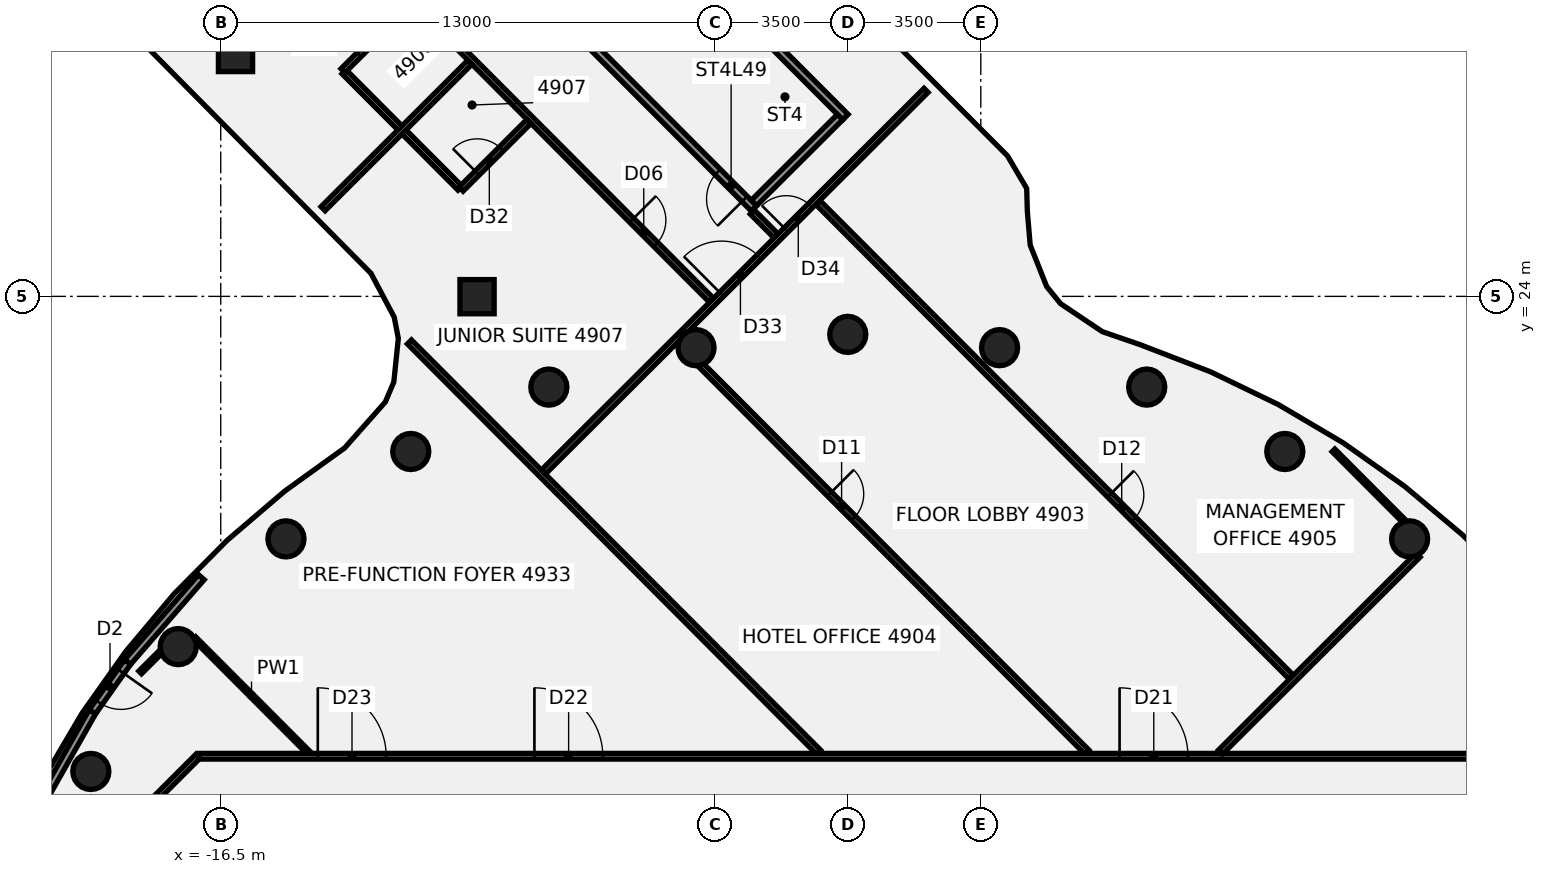
"""IFC4 building model, lengths in metres.
Left out: names, types, materials, properties, quantities, classifications, styles, units other than length and angle.
Written with IfcOpenShell. Run it as: python <this file> out.ifc"""

import sys

from ifc_helpers import new_model, si_unit, direction, frame, frame_2d, origin, origin_2d, place, context, subcontext, project, spatial, rectangle, circle, extrude, element, fill, save


model = new_model("IFC4")
c1 = context("Model", 3, precision=1e-05, world=origin(), true_north=direction((0.0, 1.0)))
c2 = subcontext(c1, "Body", "Model", "MODEL_VIEW")
j1 = project(units=[si_unit("LENGTHUNIT", "METRE"), si_unit("PLANEANGLEUNIT", "RADIAN")], contexts=[c1])
p1 = place(None, origin())
s1 = spatial("IfcSite", under=j1, at=p1, CompositionType="ELEMENT")
p2 = place(p1, origin())
s2 = spatial("IfcBuilding", under=s1, at=p2, CompositionType="ELEMENT")
p3 = place(p2, frame((0.0, 0.0, 196.9)))
s3 = spatial("IfcBuildingStorey", under=s2, at=p3, CompositionType="ELEMENT", Elevation=196.9)
for number, where, z_axis, x_axis in (
    (1, (14.784, 17.619, -0.14), (0.0, 0.0, 1.0), (1.0, 0.0, 0.0)),
    (2, (11.5, 19.919, -0.14), (0.0, 0.0, 1.0), (1.0, 0.0, 0.0)),
    (3, (7.866, 21.613, -0.14), (0.0, 0.0, 1.0), (1.0, 0.0, 0.0)),
    (4, (3.994, 22.651, -0.14), (0.0, 0.0, 1.0), (1.0, 0.0, 0.0)),
    (5, (0.0, 23.0, -0.14), (0.0, 0.0, 1.0), (1.0, 0.0, 0.0)),
    (6, (-3.994, 22.651, -0.14), (0.0, 0.0, 1.0), (1.0, 0.0, 0.0)),
    (7, (-7.866, 21.613, -0.14), (0.0, 0.0, 1.0), (1.0, 0.0, 0.0)),
    (8, (-11.5, 19.919, -0.14), (0.0, 0.0, 1.0), (1.0, 0.0, 0.0)),
    (9, (-14.784, 17.619, -0.14), (0.0, 0.0, 1.0), (1.0, 0.0, 0.0)),
    (10, (-17.619, 14.784, -0.14), (0.0, 0.0, 1.0), (1.0, 0.0, 0.0)),
    (11, (-19.919, 11.5, -0.14), (0.0, 0.0, 1.0), (1.0, 0.0, 0.0)),
):
    element("IfcColumn", number, at=place(p3, frame(where, z_axis=z_axis, x_axis=x_axis)), inside=s3, PredefinedType="COLUMN", context=c2, shape_type="SweptSolid", body=[
        extrude(circle(Radius=0.475, at=origin_2d()), origin(), (0.0, 0.0, 1.0), 3.6),
    ])
p4 = place(p3, frame((-16.111, 30.365, -0.138), z_axis=(-0.041429721391, -0.081642909364, 0.995800187556), x_axis=(0.70609506341, 0.702753082609, 0.086993484299)))
e12 = element("IfcColumn", 12, at=p4, inside=s3, PredefinedType="COLUMN", context=c2, shape_type="SweptSolid", body=[
    extrude(rectangle(XDim=0.9, YDim=0.9, at=origin_2d()), origin(), (0.0, 0.0, 1.0), 3.612),
])
p5 = place(p3, frame((-9.756, 23.992, -0.139), z_axis=(-0.009624668379, -0.04947892899, 0.998728792688), x_axis=(0.70765331906, 0.705324503584, 0.041762718624)))
e13 = element("IfcColumn", 13, at=p5, inside=s3, PredefinedType="COLUMN", context=c2, shape_type="SweptSolid", body=[
    extrude(rectangle(XDim=0.9, YDim=0.9, at=origin_2d()), origin(), (0.0, 0.0, 1.0), 3.602),
])
p6 = place(p3, frame((-17.193, 15.006, 0.0), z_axis=(0.0, 0.0, 1.0), x_axis=(0.706159706794, -0.708052588796, 0.0)))
e14 = element("IfcWall", 14, at=p6, inside=s3, PredefinedType="PARTITIONING", context=c2, shape_type="SweptSolid", body=[
    extrude(rectangle(XDim=4.256, YDim=0.1, at=frame_2d((2.128, 0.0))), origin(), (0.0, 0.0, 1.0), 2.864),
])
p7 = place(p3, frame((-16.188, 36.531, 0.0), z_axis=(0.0, 0.0, 1.0), x_axis=(0.706223553461, -0.707988907071, 0.0)))
e15 = element("IfcWall", 15, at=p7, inside=s3, PredefinedType="PARTITIONING", context=c2, shape_type="SweptSolid", body=[
    extrude(rectangle(XDim=17.84, YDim=0.15, at=frame_2d((8.92, 0.0))), origin(), (0.0, 0.0, 1.0), 2.864),
])
p8 = place(p7, frame((14.87, 0.0, 0.0)))
e16 = element("IfcOpeningElement", 16, at=p8, cuts=e15, PredefinedType="OPENING", context=c2, shape_type="SweptSolid", body=[
    extrude(rectangle(XDim=0.9, YDim=2.1, at=frame_2d((0.45, 1.05))), frame((0.0, 0.085, 0.0), z_axis=(0.0, -1.0, 0.0), x_axis=(1.0, 0.0, 0.0)), (0.0, 0.0, 1.0), 0.17),
])
p9 = place(p7, frame((3.82, 0.0, 0.0)))
e17 = element("IfcOpeningElement", 17, at=p9, cuts=e15, PredefinedType="OPENING", context=c2, shape_type="SweptSolid", body=[
    extrude(rectangle(XDim=0.9, YDim=2.1, at=frame_2d((0.45, 1.05))), frame((0.0, 0.085, 0.0), z_axis=(0.0, -1.0, 0.0), x_axis=(1.0, 0.0, 0.0)), (0.0, 0.0, 1.0), 0.17),
])
p10 = place(p3, frame((-2.512, 26.218, 0.0), z_axis=(0.0, 0.0, 1.0), x_axis=(0.706135386727, -0.708076843014, 0.0)))
e18 = element("IfcWall", 18, at=p10, inside=s3, PredefinedType="PARTITIONING", context=c2, shape_type="SweptSolid", body=[
    extrude(rectangle(XDim=0.88, YDim=0.15, at=frame_2d((0.44, 0.0))), origin(), (0.0, 0.0, 1.0), 2.864),
])
p11 = place(p3, frame((-13.255, 29.909, 0.0), z_axis=(0.0, 0.0, 1.0), x_axis=(0.706004027444, -0.708207817829, 0.0)))
e19 = element("IfcWall", 19, at=p11, inside=s3, PredefinedType="PARTITIONING", context=c2, shape_type="SweptSolid", body=[
    extrude(rectangle(XDim=4.321, YDim=0.15, at=frame_2d((2.16, 0.0))), origin(), (0.0, 0.0, 1.0), 2.864),
])
p12 = place(p3, frame((-11.534, 22.801, 0.0), z_axis=(0.0, 0.0, 1.0), x_axis=(0.706225272802, -0.707987192014, 0.0)))
e20 = element("IfcWall", 20, at=p12, inside=s3, PredefinedType="PARTITIONING", context=c2, shape_type="SweptSolid", body=[
    extrude(rectangle(XDim=15.242, YDim=0.15, at=frame_2d((7.621, 0.0))), origin(), (0.0, 0.0, 1.0), 2.864),
])
p13 = place(p3, frame((-3.87, 22.199, 0.0), z_axis=(0.0, 0.0, 1.0), x_axis=(0.706198575658, -0.708013821714, 0.0)))
e21 = element("IfcWall", 21, at=p13, inside=s3, PredefinedType="PARTITIONING", context=c2, shape_type="SweptSolid", body=[
    extrude(rectangle(XDim=14.391, YDim=0.15, at=frame_2d((7.195, 0.0))), origin(), (0.0, 0.0, 1.0), 2.864),
])
p14 = place(p13, frame((4.8, 0.0, 0.0)))
e22 = element("IfcOpeningElement", 22, at=p14, cuts=e21, PredefinedType="OPENING", context=c2, shape_type="SweptSolid", body=[
    extrude(rectangle(XDim=0.9, YDim=2.1, at=frame_2d((0.45, 1.05))), frame((0.0, 0.085, 0.0), z_axis=(0.0, -1.0, 0.0), x_axis=(1.0, 0.0, 0.0)), (0.0, 0.0, 1.0), 0.17),
])
p15 = place(p3, frame((-0.787, 26.47, 0.0), z_axis=(0.0, 0.0, 1.0), x_axis=(0.706206635575, -0.70800578237, 0.0)))
e23 = element("IfcWall", 23, at=p15, inside=s3, PredefinedType="PARTITIONING", context=c2, shape_type="SweptSolid", body=[
    extrude(rectangle(XDim=17.641, YDim=0.15, at=frame_2d((8.82, 0.0))), origin(), (0.0, 0.0, 1.0), 2.864),
])
p16 = place(p15, frame((10.87, 0.0, 0.0)))
e24 = element("IfcOpeningElement", 24, at=p16, cuts=e23, PredefinedType="OPENING", context=c2, shape_type="SweptSolid", body=[
    extrude(rectangle(XDim=0.9, YDim=2.1, at=frame_2d((0.45, 1.05))), frame((0.0, 0.085, 0.0), z_axis=(0.0, -1.0, 0.0), x_axis=(1.0, 0.0, 0.0)), (0.0, 0.0, 1.0), 0.17),
])
p17 = place(p3, frame((12.781, 19.948, 0.0), z_axis=(0.0, 0.0, 1.0), x_axis=(0.706232077359, -0.707980404326, 0.0)))
e25 = element("IfcWall", 25, at=p17, inside=s3, PredefinedType="PARTITIONING", context=c2, shape_type="SweptSolid", body=[
    extrude(rectangle(XDim=2.653, YDim=0.1, at=frame_2d((1.327, 0.0))), origin(), (0.0, 0.0, 1.0), 2.864),
])
p18 = place(p3, frame((-17.065, 11.9, 0.0), z_axis=(0.0, 0.0, 1.0), x_axis=(1.0, 0.0, 0.0)))
e26 = element("IfcWall", 26, at=p18, inside=s3, PredefinedType="PARTITIONING", context=c2, shape_type="SweptSolid", body=[
    extrude(rectangle(XDim=34.165, YDim=0.15, at=frame_2d((17.083, 0.0))), origin(), (0.0, 0.0, 1.0), 2.864),
])
p19 = place(p18, frame((24.217, 0.0, 0.0)))
e27 = element("IfcOpeningElement", 27, at=p19, cuts=e26, PredefinedType="OPENING", context=c2, shape_type="SweptSolid", body=[
    extrude(rectangle(XDim=1.8, YDim=2.1, at=frame_2d((0.9, 1.05))), frame((0.0, 0.085, 0.0), z_axis=(0.0, -1.0, 0.0), x_axis=(1.0, 0.0, 0.0)), (0.0, 0.0, 1.0), 0.17),
])
p20 = place(p18, frame((8.819, 0.0, 0.0)))
e28 = element("IfcOpeningElement", 28, at=p20, cuts=e26, PredefinedType="OPENING", context=c2, shape_type="SweptSolid", body=[
    extrude(rectangle(XDim=1.8, YDim=2.1, at=frame_2d((0.9, 1.05))), frame((0.0, 0.085, 0.0), z_axis=(0.0, -1.0, 0.0), x_axis=(1.0, 0.0, 0.0)), (0.0, 0.0, 1.0), 0.17),
])
p21 = place(p18, frame((3.119, 0.0, 0.0)))
e29 = element("IfcOpeningElement", 29, at=p21, cuts=e26, PredefinedType="OPENING", context=c2, shape_type="SweptSolid", body=[
    extrude(rectangle(XDim=1.8, YDim=2.1, at=frame_2d((0.9, 1.05))), frame((0.0, 0.085, 0.0), z_axis=(0.0, -1.0, 0.0), x_axis=(1.0, 0.0, 0.0)), (0.0, 0.0, 1.0), 0.17),
])
p22 = place(p3, frame((-18.62, 14.106, 0.0), z_axis=(0.0, 0.0, 1.0), x_axis=(0.708047707123, 0.706164601519, 0.0)))
e30 = element("IfcWall", 30, at=p22, inside=s3, PredefinedType="PARTITIONING", context=c2, shape_type="SweptSolid", body=[
    extrude(rectangle(XDim=0.778, YDim=0.1, at=frame_2d((0.389, 0.0))), origin(), (0.0, 0.0, 1.0), 2.864),
])
p23 = place(p3, frame((-18.872, 10.128, 0.0), z_axis=(0.0, 0.0, 1.0), x_axis=(0.707106781187, 0.707106781187, 0.0)))
e31 = element("IfcWall", 31, at=p23, inside=s3, PredefinedType="PARTITIONING", context=c2, shape_type="SweptSolid", body=[
    extrude(rectangle(XDim=2.505, YDim=0.15, at=frame_2d((1.253, 0.0))), origin(), (0.0, 0.0, 1.0), 2.864),
])
p24 = place(p3, frame((-13.807, 26.307, 0.0), z_axis=(0.0, 0.0, 1.0), x_axis=(0.707979130193, 0.706233354644, 0.0)))
e32 = element("IfcWall", 32, at=p24, inside=s3, PredefinedType="PARTITIONING", context=c2, shape_type="SweptSolid", body=[
    extrude(rectangle(XDim=5.454, YDim=0.15, at=frame_2d((2.727, 0.0))), origin(), (0.0, 0.0, 1.0), 2.864),
])
p25 = place(p3, frame((-13.283, 29.937, 0.0), z_axis=(0.0, 0.0, 1.0), x_axis=(0.707881585892, 0.706331126566, 0.0)))
e33 = element("IfcWall", 33, at=p25, inside=s3, PredefinedType="PARTITIONING", context=c2, shape_type="SweptSolid", body=[
    extrude(rectangle(XDim=2.52, YDim=0.15, at=frame_2d((1.26, 0.0))), origin(), (0.0, 0.0, 1.0), 2.864),
])
p26 = place(p25, frame((0.6, 0.0, 0.0)))
e34 = element("IfcOpeningElement", 34, at=p26, cuts=e33, PredefinedType="OPENING", context=c2, shape_type="SweptSolid", body=[
    extrude(rectangle(XDim=0.9, YDim=2.1, at=frame_2d((0.45, 1.05))), frame((0.0, 0.085, 0.0), z_axis=(0.0, -1.0, 0.0), x_axis=(1.0, 0.0, 0.0)), (0.0, 0.0, 1.0), 0.17),
])
p27 = place(p3, frame((-10.176, 26.821, 0.0), z_axis=(0.0, 0.0, 1.0), x_axis=(0.707881161632, 0.706331551756, 0.0)))
e35 = element("IfcWall", 35, at=p27, inside=s3, PredefinedType="PARTITIONING", context=c2, shape_type="SweptSolid", body=[
    extrude(rectangle(XDim=2.521, YDim=0.15, at=frame_2d((1.26, 0.0))), origin(), (0.0, 0.0, 1.0), 2.864),
])
p28 = place(p27, frame((0.6, 0.0, 0.0)))
e36 = element("IfcOpeningElement", 36, at=p28, cuts=e35, PredefinedType="OPENING", context=c2, shape_type="SweptSolid", body=[
    extrude(rectangle(XDim=0.9, YDim=2.1, at=frame_2d((0.45, 1.05))), frame((0.0, 0.085, 0.0), z_axis=(0.0, -1.0, 0.0), x_axis=(1.0, 0.0, 0.0)), (0.0, 0.0, 1.0), 0.17),
])
p29 = place(p3, frame((-8.007, 19.379, 0.0), z_axis=(0.0, 0.0, 1.0), x_axis=(0.708007635029, 0.706204778192, 0.0)))
e37 = element("IfcWall", 37, at=p29, inside=s3, PredefinedType="PARTITIONING", context=c2, shape_type="SweptSolid", body=[
    extrude(rectangle(XDim=14.219, YDim=0.15, at=frame_2d((7.109, 0.0))), origin(), (0.0, 0.0, 1.0), 2.864),
])
p30 = place(p29, frame((6.62, 0.0, 0.0)))
e38 = element("IfcOpeningElement", 38, at=p30, cuts=e37, PredefinedType="OPENING", context=c2, shape_type="SweptSolid", body=[
    extrude(rectangle(XDim=1.4, YDim=2.1, at=frame_2d((0.7, 1.05))), frame((0.0, 0.085, 0.0), z_axis=(0.0, -1.0, 0.0), x_axis=(1.0, 0.0, 0.0)), (0.0, 0.0, 1.0), 0.17),
])
p31 = place(p29, frame((9.02, 0.0, 0.0)))
e39 = element("IfcOpeningElement", 39, at=p31, cuts=e37, PredefinedType="OPENING", context=c2, shape_type="SweptSolid", body=[
    extrude(rectangle(XDim=0.9, YDim=2.1, at=frame_2d((0.45, 1.05))), frame((0.0, 0.085, 0.0), z_axis=(0.0, -1.0, 0.0), x_axis=(1.0, 0.0, 0.0)), (0.0, 0.0, 1.0), 0.17),
])
p32 = place(p3, frame((9.808, 12.01, 0.0), z_axis=(0.0, 0.0, 1.0), x_axis=(0.708153372922, 0.706058638088, 0.0)))
e40 = element("IfcWall", 40, at=p32, inside=s3, PredefinedType="PARTITIONING", context=c2, shape_type="SweptSolid", body=[
    extrude(rectangle(XDim=7.343, YDim=0.15, at=frame_2d((3.671, 0.0))), origin(), (0.0, 0.0, 1.0), 2.864),
])
p33 = place(p3, frame((-17.011, 16.611, 0.0), z_axis=(0.0, 0.0, 1.0), x_axis=(-0.65596013701, -0.754795534336, 0.0)))
e41 = element("IfcWall", 41, at=p33, inside=s3, PredefinedType="SOLIDWALL", context=c2, shape_type="SweptSolid", body=[
    extrude(rectangle(XDim=2.959, YDim=0.2, at=frame_2d((1.479, 0.0))), origin(), (0.0, 0.0, 1.0), 3.46),
])
p34 = place(p3, frame((-19.876, 13.071, 0.0), z_axis=(0.0, 0.0, 1.0), x_axis=(-0.492589967899, -0.870261525936, 0.0)))
e42 = element("IfcWall", 42, at=p34, inside=s3, PredefinedType="SOLIDWALL", context=c2, shape_type="SweptSolid", body=[
    extrude(rectangle(XDim=2.959, YDim=0.2, at=frame_2d((1.48, 0.0))), origin(), (0.0, 0.0, 1.0), 3.46),
])
p35 = place(p3, frame((-18.952, 14.377, 0.0), z_axis=(0.0, 0.0, 1.0), x_axis=(-0.57755153974, -0.816354223939, 0.0)))
e43 = element("IfcWall", 43, at=p35, inside=s3, PredefinedType="SOLIDWALL", context=c2, shape_type="SweptSolid", body=[
    extrude(rectangle(XDim=1.6, YDim=0.2, at=frame_2d((0.8, 0.0))), origin(), (0.0, 0.0, 1.0), 3.46),
])
p36 = place(p35, frame((0.3, 0.0, 0.0)))
e44 = element("IfcOpeningElement", 44, at=p36, cuts=e43, PredefinedType="OPENING", context=c2, shape_type="SweptSolid", body=[
    extrude(rectangle(XDim=1.0, YDim=2.4, at=frame_2d((0.5, 1.2))), frame((0.0, 0.11, 0.0), z_axis=(0.0, -1.0, 0.0), x_axis=(1.0, 0.0, 0.0)), (0.0, 0.0, 1.0), 0.22),
])
p37 = place(p3, frame((-2.469, 26.316, -0.14), z_axis=(0.0, 0.0, 1.0), x_axis=(-0.706195256835, 0.708017132013, 0.0)))
e45 = element("IfcWall", 45, at=p37, inside=s3, PredefinedType="SHEAR", context=c2, shape_type="SweptSolid", body=[
    extrude(rectangle(XDim=6.7, YDim=0.2, at=frame_2d((3.35, 0.0))), origin(), (0.0, 0.0, 1.0), 3.004),
])
p38 = place(p37, frame((0.35, 0.0, 0.0)))
e46 = element("IfcOpeningElement", 46, at=p38, cuts=e45, PredefinedType="OPENING", context=c2, shape_type="SweptSolid", body=[
    extrude(rectangle(XDim=1.0, YDim=2.1, at=frame_2d((0.5, 1.05))), frame((0.0, 0.11, 0.0), z_axis=(0.0, -1.0, 0.0), x_axis=(1.0, 0.0, 0.0)), (0.0, 0.0, 1.0), 0.22),
])
p39 = place(p3, frame((-0.062, 28.718, -0.14), z_axis=(0.0, 0.0, 1.0), x_axis=(-0.706213475762, 0.707998959499, 0.0)))
e47 = element("IfcWall", 47, at=p39, inside=s3, PredefinedType="SHEAR", context=c2, shape_type="SweptSolid", body=[
    extrude(rectangle(XDim=6.7, YDim=0.2, at=frame_2d((3.35, 0.0))), origin(), (0.0, 0.0, 1.0), 3.004),
])
p40 = place(p3, frame((-0.204, 28.718, -0.14), z_axis=(0.0, 0.0, 1.0), x_axis=(-0.707983681798, -0.706228791758, 0.0)))
e48 = element("IfcWall", 48, at=p40, inside=s3, PredefinedType="SHEAR", context=c2, shape_type="SweptSolid", body=[
    extrude(rectangle(XDim=3.2, YDim=0.2, at=frame_2d((1.6, 0.0))), origin(), (0.0, 0.0, 1.0), 3.004),
])
p41 = place(p8, frame((0.9, 0.0, 0.0), z_axis=(0.0, 0.0, 1.0), x_axis=(-1.0, 0.0, 0.0)))
e49 = element("IfcDoor", 49, at=p41, inside=s3, OperationType="SINGLE_SWING_RIGHT", PredefinedType="DOOR", context=c2, shape_type="SweptSolid", body=[
    extrude(rectangle(XDim=0.9, YDim=2.1, at=frame_2d((0.45, 1.05))), frame((0.0, 0.025, 0.0), z_axis=(0.0, -1.0, 0.0), x_axis=(1.0, 0.0, 0.0)), (0.0, 0.0, 1.0), 0.05),
])
fill(e16, e49)
p42 = place(p14, frame((0.9, 0.0, 0.0), z_axis=(0.0, 0.0, 1.0), x_axis=(-1.0, 0.0, 0.0)))
e50 = element("IfcDoor", 50, at=p42, inside=s3, OperationType="SINGLE_SWING_LEFT", PredefinedType="DOOR", context=c2, shape_type="SweptSolid", body=[
    extrude(rectangle(XDim=0.9, YDim=2.1, at=frame_2d((0.45, 1.05))), frame((0.0, 0.025, 0.0), z_axis=(0.0, -1.0, 0.0), x_axis=(1.0, 0.0, 0.0)), (0.0, 0.0, 1.0), 0.05),
])
fill(e22, e50)
p43 = place(p16, origin())
e51 = element("IfcDoor", 51, at=p43, inside=s3, OperationType="SINGLE_SWING_LEFT", PredefinedType="DOOR", context=c2, shape_type="SweptSolid", body=[
    extrude(rectangle(XDim=0.9, YDim=2.1, at=frame_2d((0.45, 1.05))), frame((0.0, 0.025, 0.0), z_axis=(0.0, -1.0, 0.0), x_axis=(1.0, 0.0, 0.0)), (0.0, 0.0, 1.0), 0.05),
])
fill(e24, e51)
p44 = place(p19, frame((1.8, 0.0, 0.0), z_axis=(0.0, 0.0, 1.0), x_axis=(-1.0, 0.0, 0.0)))
e52 = element("IfcDoor", 52, at=p44, inside=s3, OperationType="DOUBLE_DOOR_SINGLE_SWING", PredefinedType="DOOR", context=c2, shape_type="SweptSolid", body=[
    extrude(rectangle(XDim=1.8, YDim=2.1, at=frame_2d((0.9, 1.05))), frame((0.0, 0.025, 0.0), z_axis=(0.0, -1.0, 0.0), x_axis=(1.0, 0.0, 0.0)), (0.0, 0.0, 1.0), 0.05),
])
fill(e27, e52)
p45 = place(p20, origin())
e53 = element("IfcDoor", 53, at=p45, inside=s3, OperationType="DOUBLE_DOOR_SINGLE_SWING", PredefinedType="DOOR", context=c2, shape_type="SweptSolid", body=[
    extrude(rectangle(XDim=1.8, YDim=2.1, at=frame_2d((0.9, 1.05))), frame((0.0, 0.025, 0.0), z_axis=(0.0, -1.0, 0.0), x_axis=(1.0, 0.0, 0.0)), (0.0, 0.0, 1.0), 0.05),
])
fill(e28, e53)
p46 = place(p21, origin())
e54 = element("IfcDoor", 54, at=p46, inside=s3, OperationType="DOUBLE_DOOR_SINGLE_SWING", PredefinedType="DOOR", context=c2, shape_type="SweptSolid", body=[
    extrude(rectangle(XDim=1.8, YDim=2.1, at=frame_2d((0.9, 1.05))), frame((0.0, 0.025, 0.0), z_axis=(0.0, -1.0, 0.0), x_axis=(1.0, 0.0, 0.0)), (0.0, 0.0, 1.0), 0.05),
])
fill(e29, e54)
p47 = place(p26, frame((0.9, 0.0, 0.0), z_axis=(0.0, 0.0, 1.0), x_axis=(-1.0, 0.0, 0.0)))
e55 = element("IfcDoor", 55, at=p47, inside=s3, OperationType="SINGLE_SWING_LEFT", PredefinedType="DOOR", context=c2, shape_type="SweptSolid", body=[
    extrude(rectangle(XDim=0.9, YDim=2.1, at=frame_2d((0.45, 1.05))), frame((0.0, 0.025, 0.0), z_axis=(0.0, -1.0, 0.0), x_axis=(1.0, 0.0, 0.0)), (0.0, 0.0, 1.0), 0.05),
])
fill(e34, e55)
p48 = place(p28, origin())
e56 = element("IfcDoor", 56, at=p48, inside=s3, OperationType="SINGLE_SWING_RIGHT", PredefinedType="DOOR", context=c2, shape_type="SweptSolid", body=[
    extrude(rectangle(XDim=0.9, YDim=2.1, at=frame_2d((0.45, 1.05))), frame((0.0, 0.025, 0.0), z_axis=(0.0, -1.0, 0.0), x_axis=(1.0, 0.0, 0.0)), (0.0, 0.0, 1.0), 0.05),
])
fill(e36, e56)
p49 = place(p30, frame((1.4, 0.0, 0.0), z_axis=(0.0, 0.0, 1.0), x_axis=(-1.0, 0.0, 0.0)))
e57 = element("IfcDoor", 57, at=p49, inside=s3, OperationType="DOUBLE_DOOR_SINGLE_SWING", PredefinedType="DOOR", context=c2, shape_type="SweptSolid", body=[
    extrude(rectangle(XDim=1.4, YDim=2.1, at=frame_2d((0.7, 1.05))), frame((0.0, 0.025, 0.0), z_axis=(0.0, -1.0, 0.0), x_axis=(1.0, 0.0, 0.0)), (0.0, 0.0, 1.0), 0.05),
])
fill(e38, e57)
p50 = place(p31, origin())
e58 = element("IfcDoor", 58, at=p50, inside=s3, OperationType="SINGLE_SWING_LEFT", PredefinedType="DOOR", context=c2, shape_type="SweptSolid", body=[
    extrude(rectangle(XDim=0.9, YDim=2.1, at=frame_2d((0.45, 1.05))), frame((0.0, 0.025, 0.0), z_axis=(0.0, -1.0, 0.0), x_axis=(1.0, 0.0, 0.0)), (0.0, 0.0, 1.0), 0.05),
])
fill(e39, e58)
p51 = place(p36, origin())
e59 = element("IfcDoor", 59, at=p51, inside=s3, OperationType="SINGLE_SWING_LEFT", PredefinedType="DOOR", context=c2, shape_type="SweptSolid", body=[
    extrude(rectangle(XDim=1.0, YDim=2.4, at=frame_2d((0.5, 1.2))), frame((0.0, 0.025, 0.0), z_axis=(0.0, -1.0, 0.0), x_axis=(1.0, 0.0, 0.0)), (0.0, 0.0, 1.0), 0.05),
])
fill(e44, e59)
p52 = place(p38, origin())
e60 = element("IfcDoor", 60, at=p52, inside=s3, OperationType="SINGLE_SWING_LEFT", PredefinedType="DOOR", context=c2, shape_type="SweptSolid", body=[
    extrude(rectangle(XDim=1.0, YDim=2.1, at=frame_2d((0.5, 1.05))), frame((0.0, 0.025, 0.0), z_axis=(0.0, -1.0, 0.0), x_axis=(1.0, 0.0, 0.0)), (0.0, 0.0, 1.0), 0.05),
])
fill(e46, e60)
save(model, sys.argv[1])
